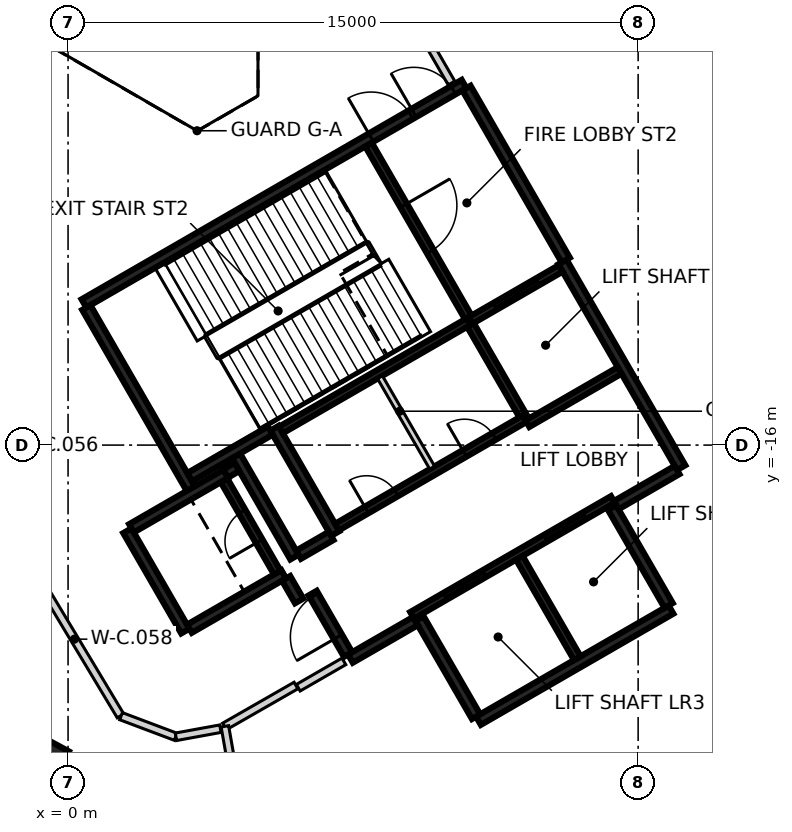
"""IFC4 building model, lengths in metres.
Left out: names, types, materials, properties, quantities, classifications, styles, units other than length and angle.
Written with IfcOpenShell. Run it as: python <this file> out.ifc"""

import sys

from ifc_helpers import new_model, si_unit, direction, frame, frame_2d, origin, origin_2d, place, context, subcontext, project, spatial, rectangle, extrude, element, fill, save


model = new_model("IFC4")
c1 = context("Model", 3, precision=1e-05, world=origin(), true_north=direction((0.0, 1.0)))
c2 = subcontext(c1, "Body", "Model", "MODEL_VIEW")
j1 = project(units=[si_unit("LENGTHUNIT", "METRE"), si_unit("PLANEANGLEUNIT", "RADIAN")], contexts=[c1])
p1 = place(None, origin())
s1 = spatial("IfcSite", under=j1, at=p1, CompositionType="ELEMENT")
p2 = place(p1, origin())
s2 = spatial("IfcBuilding", under=s1, at=p2, CompositionType="ELEMENT")
p3 = place(p2, frame((0.0, 0.0, 14.0)))
s3 = spatial("IfcBuildingStorey", under=s2, at=p3, CompositionType="ELEMENT", Elevation=14.0)
p4 = place(p3, frame((-1.197, -24.423, -0.35), z_axis=(0.0, 0.0, 1.0), x_axis=(0.476198301069, 0.879337920289, 0.0)))
e1 = element("IfcColumn", 1, at=p4, inside=s3, PredefinedType="COLUMN", context=c2, shape_type="SweptSolid", body=[
    extrude(rectangle(XDim=1.8, YDim=1.8, at=origin_2d()), origin(), (0.0, 0.0, 1.0), 3.1),
])
p5 = place(p3, frame((0.417, -12.273, 0.0), z_axis=(0.0, 0.0, 1.0), x_axis=(0.866021906294, 0.500006057782, 0.0)))
e2 = element("IfcWall", 2, at=p5, inside=s3, PredefinedType="SHEAR", context=c2, shape_type="SweptSolid", body=[
    extrude(rectangle(XDim=11.55, YDim=0.25, at=frame_2d((5.775, 0.0))), origin(), (0.0, 0.0, 1.0), 5.15),
])
p6 = place(p5, frame((10.025, 0.0, 0.0)))
e3 = element("IfcOpeningElement", 3, at=p6, cuts=e2, PredefinedType="OPENING", context=c2, shape_type="SweptSolid", body=[
    extrude(rectangle(XDim=1.2, YDim=2.1, at=frame_2d((0.6, 1.05))), frame((0.0, 0.135, 0.0), z_axis=(0.0, -1.0, 0.0), x_axis=(1.0, 0.0, 0.0)), (0.0, 0.0, 1.0), 0.27),
])
p7 = place(p5, frame((8.725, 0.0, 0.0)))
e4 = element("IfcOpeningElement", 4, at=p7, cuts=e2, PredefinedType="OPENING", context=c2, shape_type="SweptSolid", body=[
    extrude(rectangle(XDim=1.2, YDim=2.1, at=frame_2d((0.6, 1.05))), frame((0.0, 0.135, 0.0), z_axis=(0.0, -1.0, 0.0), x_axis=(1.0, 0.0, 0.0)), (0.0, 0.0, 1.0), 0.27),
])
p8 = place(p3, frame((13.008, -11.181, 0.0), z_axis=(0.0, 0.0, 1.0), x_axis=(0.500004234368, -0.866022959057, 0.0)))
e5 = element("IfcWall", 5, at=p8, inside=s3, PredefinedType="SHEAR", context=c2, shape_type="SweptSolid", body=[
    extrude(rectangle(XDim=6.25, YDim=0.25, at=frame_2d((3.125, 0.0))), origin(), (0.0, 0.0, 1.0), 5.15),
])
p9 = place(p3, frame((15.865, -20.328, 0.0), z_axis=(0.0, 0.0, 1.0), x_axis=(-0.86602852612, -0.499994591916, 0.0)))
e6 = element("IfcWall", 6, at=p9, inside=s3, PredefinedType="SHEAR", context=c2, shape_type="SweptSolid", body=[
    extrude(rectangle(XDim=5.85, YDim=0.25, at=frame_2d((2.925, 0.0))), origin(), (0.0, 0.0, 1.0), 5.15),
])
p10 = place(p3, frame((3.235, -17.153, 0.0), z_axis=(0.0, 0.0, 1.0), x_axis=(-0.500008851346, 0.866020293397, 0.0)))
e7 = element("IfcWall", 7, at=p10, inside=s3, PredefinedType="SHEAR", context=c2, shape_type="SweptSolid", body=[
    extrude(rectangle(XDim=5.51, YDim=0.25, at=frame_2d((2.755, 0.0))), origin(), (0.0, 0.0, 1.0), 5.15),
])
p11 = place(p3, frame((10.483, -6.606, 0.0), z_axis=(0.0, 0.0, 1.0), x_axis=(0.49999885962, -0.866026062182, 0.0)))
e8 = element("IfcWall", 8, at=p11, inside=s3, PredefinedType="SHEAR", context=c2, shape_type="SweptSolid", body=[
    extrude(rectangle(XDim=5.225, YDim=0.25, at=frame_2d((2.612, 0.0))), origin(), (0.0, 0.0, 1.0), 5.15),
])
p12 = place(p3, frame((7.031, -18.327, 0.0), z_axis=(0.0, 0.0, 1.0), x_axis=(-0.499971222258, 0.866042017984, 0.0)))
e9 = element("IfcWall", 9, at=p12, inside=s3, PredefinedType="SHEAR", context=c2, shape_type="SweptSolid", body=[
    extrude(rectangle(XDim=3.2, YDim=0.25, at=frame_2d((1.6, 0.0))), origin(), (0.0, 0.0, 1.0), 5.15),
])
for number, where, z_axis, x_axis in (
    (10, (14.315, -17.644, 0.0), (0.0, 0.0, 1.0), (0.5, -0.866, 0.0)),
    (11, (10.736, -23.145, 0.0), (0.0, 0.0, 1.0), (-0.5, 0.866, 0.0)),
):
    element("IfcWall", number, at=place(p3, frame(where, z_axis=z_axis, x_axis=x_axis)), inside=s3, PredefinedType="SHEAR", context=c2, shape_type="SweptSolid", body=[
        extrude(rectangle(XDim=2.974, YDim=0.25, at=frame_2d((1.487, 0.0))), origin(), (0.0, 0.0, 1.0), 5.15),
    ])
p13 = place(p3, frame((3.085, -20.894, 0.0), z_axis=(0.0, 0.0, 1.0), x_axis=(-0.499978833458, 0.866037623948, 0.0)))
e12 = element("IfcWall", 12, at=p13, inside=s3, PredefinedType="SHEAR", context=c2, shape_type="SweptSolid", body=[
    extrude(rectangle(XDim=3.05, YDim=0.25, at=frame_2d((1.525, 0.0))), origin(), (0.0, 0.0, 1.0), 5.15),
])
p14 = place(p3, frame((1.669, -18.19, 0.0), z_axis=(0.0, 0.0, 1.0), x_axis=(0.866042235819, 0.499970844928, 0.0)))
e13 = element("IfcWall", 13, at=p14, inside=s3, PredefinedType="SHEAR", context=c2, shape_type="SweptSolid", body=[
    extrude(rectangle(XDim=2.865, YDim=0.25, at=frame_2d((1.432, 0.0))), origin(), (0.0, 0.0, 1.0), 5.15),
])
p15 = place(p3, frame((5.675, -19.399, 0.0), z_axis=(0.0, 0.0, 1.0), x_axis=(-0.866026637627, -0.499997862916, 0.0)))
e14 = element("IfcWall", 14, at=p15, inside=s3, PredefinedType="SHEAR", context=c2, shape_type="SweptSolid", body=[
    extrude(rectangle(XDim=2.865, YDim=0.25, at=frame_2d((1.432, 0.0))), origin(), (0.0, 0.0, 1.0), 5.15),
])
p16 = place(p3, frame((4.414, -16.276, 0.0), z_axis=(0.0, 0.0, 1.0), x_axis=(0.500003324108, -0.866023484601, 0.0)))
e15 = element("IfcWall", 15, at=p16, inside=s3, PredefinedType="SHEAR", context=c2, shape_type="SweptSolid", body=[
    extrude(rectangle(XDim=3.085, YDim=0.25, at=frame_2d((1.542, 0.0))), origin(), (0.0, 0.0, 1.0), 5.15),
])
p17 = place(p3, frame((5.322, -15.619, 0.0), z_axis=(0.0, 0.0, 1.0), x_axis=(-0.866026229868, -0.499998569178, 0.0)))
e16 = element("IfcWall", 16, at=p17, inside=s3, PredefinedType="SHEAR", context=c2, shape_type="SweptSolid", body=[
    extrude(rectangle(XDim=2.449, YDim=0.25, at=frame_2d((1.225, 0.0))), origin(), (0.0, 0.0, 1.0), 5.15),
])
p18 = place(p3, frame((9.14, -20.631, 0.0), z_axis=(0.0, 0.0, 1.0), x_axis=(-0.866043531843, -0.499968599967, 0.0)))
e17 = element("IfcWall", 17, at=p18, inside=s3, PredefinedType="SHEAR", context=c2, shape_type="SweptSolid", body=[
    extrude(rectangle(XDim=1.975, YDim=0.25, at=frame_2d((0.987, 0.0))), origin(), (0.0, 0.0, 1.0), 5.15),
])
p19 = place(p3, frame((16.025, -16.656, 0.0), z_axis=(0.0, 0.0, 1.0), x_axis=(-0.866016279763, -0.500015802937, 0.0)))
e18 = element("IfcWall", 18, at=p19, inside=s3, PredefinedType="SHEAR", context=c2, shape_type="SweptSolid", body=[
    extrude(rectangle(XDim=1.849, YDim=0.25, at=frame_2d((0.925, 0.0))), origin(), (0.0, 0.0, 1.0), 5.15),
])
p20 = place(p3, frame((7.367, -21.51, 0.0), z_axis=(0.0, 0.0, 1.0), x_axis=(-0.499983108224, 0.866035156036, 0.0)))
e19 = element("IfcWall", 19, at=p20, inside=s3, PredefinedType="SHEAR", context=c2, shape_type="SweptSolid", body=[
    extrude(rectangle(XDim=1.865, YDim=0.25, at=frame_2d((0.932, 0.0))), origin(), (0.0, 0.0, 1.0), 5.15),
])
p21 = place(p20, frame((0.535, 0.0, 0.0)))
e20 = element("IfcOpeningElement", 20, at=p21, cuts=e19, PredefinedType="OPENING", context=c2, shape_type="SweptSolid", body=[
    extrude(rectangle(XDim=1.25, YDim=2.1, at=frame_2d((0.625, 1.05))), frame((0.0, 0.135, 0.0), z_axis=(0.0, -1.0, 0.0), x_axis=(1.0, 0.0, 0.0)), (0.0, 0.0, 1.0), 0.27),
])
p22 = place(p3, frame((6.065, -18.885, 0.0), z_axis=(0.0, 0.0, 1.0), x_axis=(0.866017078145, 0.500014420154, 0.0)))
e21 = element("IfcWall", 21, at=p22, inside=s3, PredefinedType="SHEAR", context=c2, shape_type="SweptSolid", body=[
    extrude(rectangle(XDim=0.989, YDim=0.25, at=frame_2d((0.495, 0.0))), origin(), (0.0, 0.0, 1.0), 5.15),
])
p23 = place(p3, frame((6.08, -20.1, 0.0), z_axis=(0.0, 0.0, 1.0), x_axis=(-0.500051773299, 0.865995510393, 0.0)))
e22 = element("IfcWall", 22, at=p23, inside=s3, PredefinedType="SHEAR", context=c2, shape_type="SweptSolid", body=[
    extrude(rectangle(XDim=0.685, YDim=0.25, at=frame_2d((0.342, 0.0))), origin(), (0.0, 0.0, 1.0), 5.15),
])
p24 = place(p3, frame((4.145, -16.749, 0.0), z_axis=(0.0, 0.0, 1.0), x_axis=(0.866185586049, 0.49972245349, 0.0)))
e23 = element("IfcWall", 23, at=p24, inside=s3, PredefinedType="SHEAR", context=c2, shape_type="SweptSolid", body=[
    extrude(rectangle(XDim=0.344, YDim=0.25, at=frame_2d((0.172, 0.0))), origin(), (0.0, 0.0, 1.0), 5.15),
])
p25 = place(p3, frame((9.052, -20.48, 0.0), z_axis=(0.0, 0.0, 1.0), x_axis=(0.866030299012, 0.499991521122, 0.0)))
e24 = element("IfcWall", 24, at=p25, inside=s3, PredefinedType="SHEAR", context=c2, shape_type="SweptSolid", body=[
    extrude(rectangle(XDim=6.1, YDim=0.2, at=frame_2d((3.05, 0.0))), origin(), (0.0, 0.0, 1.0), 5.15),
])
p26 = place(p25, frame((1.0, 0.0, 0.0)))
e25 = element("IfcOpeningElement", 25, at=p26, cuts=e24, PredefinedType="OPENING", context=c2, shape_type="SweptSolid", body=[
    extrude(rectangle(XDim=1.2, YDim=2.1, at=frame_2d((0.6, 1.05))), frame((0.0, 0.11, 0.0), z_axis=(0.0, -1.0, 0.0), x_axis=(1.0, 0.0, 0.0)), (0.0, 0.0, 1.0), 0.22),
])
p27 = place(p25, frame((4.05, 0.0, 0.0)))
e26 = element("IfcOpeningElement", 26, at=p27, cuts=e24, PredefinedType="OPENING", context=c2, shape_type="SweptSolid", body=[
    extrude(rectangle(XDim=1.2, YDim=2.1, at=frame_2d((0.6, 1.05))), frame((0.0, 0.11, 0.0), z_axis=(0.0, -1.0, 0.0), x_axis=(1.0, 0.0, 0.0)), (0.0, 0.0, 1.0), 0.22),
])
p28 = place(p3, frame((10.538, -12.752, 0.0), z_axis=(0.0, 0.0, 1.0), x_axis=(-0.866038630372, -0.499977090179, 0.0)))
e27 = element("IfcWall", 27, at=p28, inside=s3, PredefinedType="SHEAR", context=c2, shape_type="SweptSolid", body=[
    extrude(rectangle(XDim=5.699, YDim=0.2, at=frame_2d((2.85, 0.0))), origin(), (0.0, 0.0, 1.0), 5.15),
])
p29 = place(p3, frame((7.077, -18.156, 0.0), z_axis=(0.0, 0.0, 1.0), x_axis=(0.866038630372, 0.499977090179, 0.0)))
e28 = element("IfcWall", 28, at=p29, inside=s3, PredefinedType="SHEAR", context=c2, shape_type="SweptSolid", body=[
    extrude(rectangle(XDim=5.699, YDim=0.2, at=frame_2d((2.85, 0.0))), origin(), (0.0, 0.0, 1.0), 5.15),
])
p30 = place(p29, frame((0.899, 0.0, 0.0)))
e29 = element("IfcOpeningElement", 29, at=p30, cuts=e28, PredefinedType="OPENING", context=c2, shape_type="SweptSolid", body=[
    extrude(rectangle(XDim=0.9, YDim=2.1, at=frame_2d((0.45, 1.05))), frame((0.0, 0.11, 0.0), z_axis=(0.0, -1.0, 0.0), x_axis=(1.0, 0.0, 0.0)), (0.0, 0.0, 1.0), 0.22),
])
p31 = place(p29, frame((3.874, 0.0, 0.0)))
e30 = element("IfcOpeningElement", 30, at=p31, cuts=e28, PredefinedType="OPENING", context=c2, shape_type="SweptSolid", body=[
    extrude(rectangle(XDim=0.9, YDim=2.1, at=frame_2d((0.45, 1.05))), frame((0.0, 0.11, 0.0), z_axis=(0.0, -1.0, 0.0), x_axis=(1.0, 0.0, 0.0)), (0.0, 0.0, 1.0), 0.22),
])
p32 = place(p3, frame((7.906, -8.094, 0.0), z_axis=(0.0, 0.0, 1.0), x_axis=(0.500024287448, -0.866011380966, 0.0)))
e31 = element("IfcWall", 31, at=p32, inside=s3, PredefinedType="SHEAR", context=c2, shape_type="SweptSolid", body=[
    extrude(rectangle(XDim=5.251, YDim=0.2, at=frame_2d((2.625, 0.0))), origin(), (0.0, 0.0, 1.0), 5.15),
])
p33 = place(p32, frame((1.849, 0.0, 0.0)))
e32 = element("IfcOpeningElement", 32, at=p33, cuts=e31, PredefinedType="OPENING", context=c2, shape_type="SweptSolid", body=[
    extrude(rectangle(XDim=1.4, YDim=2.1, at=frame_2d((0.7, 1.05))), frame((0.0, 0.11, 0.0), z_axis=(0.0, -1.0, 0.0), x_axis=(1.0, 0.0, 0.0)), (0.0, 0.0, 1.0), 0.22),
])
p34 = place(p3, frame((11.875, -18.967, 0.0), z_axis=(0.0, 0.0, 1.0), x_axis=(0.49998131003, -0.866036194175, 0.0)))
e33 = element("IfcWall", 33, at=p34, inside=s3, PredefinedType="SHEAR", context=c2, shape_type="SweptSolid", body=[
    extrude(rectangle(XDim=3.048, YDim=0.2, at=frame_2d((1.524, 0.0))), origin(), (0.0, 0.0, 1.0), 5.15),
])
p35 = place(p3, frame((5.503, -19.352, 0.0), z_axis=(0.0, 0.0, 1.0), x_axis=(-0.499986818241, 0.866033014143, 0.0)))
e34 = element("IfcWall", 34, at=p35, inside=s3, PredefinedType="SHEAR", context=c2, shape_type="SweptSolid", body=[
    extrude(rectangle(XDim=2.798, YDim=0.2, at=frame_2d((1.399, 0.0))), origin(), (0.0, 0.0, 1.0), 5.15),
])
p36 = place(p35, frame((0.949, 0.0, 0.0)))
e35 = element("IfcOpeningElement", 35, at=p36, cuts=e34, PredefinedType="OPENING", context=c2, shape_type="SweptSolid", body=[
    extrude(rectangle(XDim=0.9, YDim=2.1, at=frame_2d((0.45, 1.05))), frame((0.0, 0.11, 0.0), z_axis=(0.0, -1.0, 0.0), x_axis=(1.0, 0.0, 0.0)), (0.0, 0.0, 1.0), 0.22),
])
p37 = place(p3, frame((11.963, -15.22, 0.0), z_axis=(0.0, 0.0, 1.0), x_axis=(-0.500034990121, 0.866005201286, 0.0)))
e36 = element("IfcWall", 36, at=p37, inside=s3, PredefinedType="SHEAR", context=c2, shape_type="SweptSolid", body=[
    extrude(rectangle(XDim=2.75, YDim=0.2, at=frame_2d((1.375, 0.0))), origin(), (0.0, 0.0, 1.0), 5.15),
])
p38 = place(p3, frame((10.587, -12.723, 0.0), z_axis=(0.0, 0.0, 1.0), x_axis=(0.866037306777, 0.499979382845, 0.0)))
e37 = element("IfcWall", 37, at=p38, inside=s3, PredefinedType="SHEAR", context=c2, shape_type="SweptSolid", body=[
    extrude(rectangle(XDim=2.742, YDim=0.2, at=frame_2d((1.371, 0.0))), origin(), (0.0, 0.0, 1.0), 5.15),
])
p39 = place(p38, frame((0.743, 0.0, 0.0)))
e38 = element("IfcOpeningElement", 38, at=p39, cuts=e37, PredefinedType="OPENING", context=c2, shape_type="SweptSolid", body=[
    extrude(rectangle(XDim=1.3, YDim=2.1, at=frame_2d((0.65, 1.05))), frame((0.0, 0.11, 0.0), z_axis=(0.0, -1.0, 0.0), x_axis=(1.0, 0.0, 0.0)), (0.0, 0.0, 1.0), 0.22),
])
p40 = place(p3, frame((14.512, -14.037, 0.0), z_axis=(0.0, 0.0, 1.0), x_axis=(-0.866044696403, -0.499966582715, 0.0)))
e39 = element("IfcWall", 39, at=p40, inside=s3, PredefinedType="SHEAR", context=c2, shape_type="SweptSolid", body=[
    extrude(rectangle(XDim=2.799, YDim=0.2, at=frame_2d((1.399, 0.0))), origin(), (0.0, 0.0, 1.0), 5.15),
])
p41 = place(p3, frame((8.207, -14.214, 0.0), z_axis=(0.0, 0.0, 1.0), x_axis=(0.50002746344, -0.86600954718, 0.0)))
e40 = element("IfcWall", 40, at=p41, inside=s3, PredefinedType="PARTITIONING", context=c2, shape_type="SweptSolid", body=[
    extrude(rectangle(XDim=2.748, YDim=0.15, at=frame_2d((1.374, 0.0))), origin(), (0.0, 0.0, 1.0), 5.15),
])
p42 = place(p3, frame((-1.045, -19.088, 0.0), z_axis=(0.0, 0.0, 1.0), x_axis=(0.51489213726, -0.857254971982, 0.0)))
e41 = element("IfcWall", 41, at=p42, inside=s3, PredefinedType="PARTITIONING", context=c2, shape_type="SweptSolid", body=[
    extrude(rectangle(XDim=4.709, YDim=0.2, at=frame_2d((2.354, 0.0))), origin(), (0.0, 0.0, 1.0), 5.15),
])
p43 = place(p3, frame((1.394, -23.133, 0.0), z_axis=(0.0, 0.0, 1.0), x_axis=(0.935740267615, -0.352689880154, 0.0)))
e42 = element("IfcWall", 42, at=p43, inside=s3, PredefinedType="PARTITIONING", context=c2, shape_type="SweptSolid", body=[
    extrude(rectangle(XDim=1.537, YDim=0.2, at=frame_2d((0.768, 0.0))), origin(), (0.0, 0.0, 1.0), 5.15),
])
p44 = place(p3, frame((2.839, -23.675, 0.0), z_axis=(0.0, 0.0, 1.0), x_axis=(0.983781026783, 0.179373608267, 0.0)))
e43 = element("IfcWall", 43, at=p44, inside=s3, PredefinedType="PARTITIONING", context=c2, shape_type="SweptSolid", body=[
    extrude(rectangle(XDim=1.188, YDim=0.2, at=frame_2d((0.594, 0.0))), origin(), (0.0, 0.0, 1.0), 5.15),
])
p45 = place(p3, frame((4.116, -23.404, 0.0), z_axis=(0.0, 0.0, 1.0), x_axis=(0.867604920029, 0.497254163121, 0.0)))
e44 = element("IfcWall", 44, at=p45, inside=s3, PredefinedType="PARTITIONING", context=c2, shape_type="SweptSolid", body=[
    extrude(rectangle(XDim=2.168, YDim=0.2, at=frame_2d((1.084, 0.0))), origin(), (0.0, 0.0, 1.0), 5.15),
])
p46 = place(p3, frame((6.057, -22.384, 0.0), z_axis=(0.0, 0.0, 1.0), x_axis=(0.866100566266, 0.499869792159, 0.0)))
e45 = element("IfcWall", 45, at=p46, inside=s3, PredefinedType="PARTITIONING", context=c2, shape_type="SweptSolid", body=[
    extrude(rectangle(XDim=1.386, YDim=0.2, at=frame_2d((0.693, 0.0))), origin(), (0.0, 0.0, 1.0), 5.15),
])
p47 = place(p3, frame((9.101, -4.763, 0.0), z_axis=(0.0, 0.0, 1.0), x_axis=(0.500150029396, -0.865938766944, 0.0)))
e46 = element("IfcWall", 46, at=p47, inside=s3, PredefinedType="PARTITIONING", context=c2, shape_type="SweptSolid", body=[
    extrude(rectangle(XDim=1.977, YDim=0.2, at=frame_2d((0.989, 0.0))), origin(), (0.0, 0.0, 1.0), 5.15),
])
p48 = place(p3, frame((4.126, -23.4, 0.0), z_axis=(0.0, 0.0, 1.0), x_axis=(0.173678575234, -0.984802392617, 0.0)))
e47 = element("IfcWall", 47, at=p48, inside=s3, PredefinedType="PARTITIONING", context=c2, shape_type="SweptSolid", body=[
    extrude(rectangle(XDim=11.48, YDim=0.2, at=frame_2d((5.74, 0.0))), origin(), (0.0, 0.0, 1.0), 2.75),
])
p49 = place(p39, origin())
e48 = element("IfcDoor", 48, at=p49, inside=s3, OperationType="SLIDING_TO_RIGHT", PredefinedType="DOOR", context=c2, shape_type="SweptSolid", body=[
    extrude(rectangle(XDim=1.3, YDim=2.1, at=frame_2d((0.65, 1.05))), frame((0.0, 0.025, 0.0), z_axis=(0.0, -1.0, 0.0), x_axis=(1.0, 0.0, 0.0)), (0.0, 0.0, 1.0), 0.05),
])
fill(e38, e48)
p50 = place(p26, origin())
e49 = element("IfcDoor", 49, at=p50, inside=s3, OperationType="DOUBLE_DOOR_SLIDING", PredefinedType="DOOR", context=c2, shape_type="SweptSolid", body=[
    extrude(rectangle(XDim=1.2, YDim=2.1, at=frame_2d((0.6, 1.05))), frame((0.0, 0.025, 0.0), z_axis=(0.0, -1.0, 0.0), x_axis=(1.0, 0.0, 0.0)), (0.0, 0.0, 1.0), 0.05),
])
fill(e25, e49)
p51 = place(p27, origin())
e50 = element("IfcDoor", 50, at=p51, inside=s3, OperationType="DOUBLE_DOOR_SLIDING", PredefinedType="DOOR", context=c2, shape_type="SweptSolid", body=[
    extrude(rectangle(XDim=1.2, YDim=2.1, at=frame_2d((0.6, 1.05))), frame((0.0, 0.025, 0.0), z_axis=(0.0, -1.0, 0.0), x_axis=(1.0, 0.0, 0.0)), (0.0, 0.0, 1.0), 0.05),
])
fill(e26, e50)
p52 = place(p21, origin())
e51 = element("IfcDoor", 51, at=p52, inside=s3, OperationType="SINGLE_SWING_LEFT", PredefinedType="DOOR", context=c2, shape_type="SweptSolid", body=[
    extrude(rectangle(XDim=1.25, YDim=2.1, at=frame_2d((0.625, 1.05))), frame((0.0, 0.025, 0.0), z_axis=(0.0, -1.0, 0.0), x_axis=(1.0, 0.0, 0.0)), (0.0, 0.0, 1.0), 0.05),
])
fill(e20, e51)
p53 = place(p6, origin())
e52 = element("IfcDoor", 52, at=p53, inside=s3, OperationType="SINGLE_SWING_LEFT", PredefinedType="DOOR", context=c2, shape_type="SweptSolid", body=[
    extrude(rectangle(XDim=1.2, YDim=2.1, at=frame_2d((0.6, 1.05))), frame((0.0, 0.025, 0.0), z_axis=(0.0, -1.0, 0.0), x_axis=(1.0, 0.0, 0.0)), (0.0, 0.0, 1.0), 0.05),
])
fill(e3, e52)
p54 = place(p7, origin())
e53 = element("IfcDoor", 53, at=p54, inside=s3, OperationType="SINGLE_SWING_RIGHT", PredefinedType="DOOR", context=c2, shape_type="SweptSolid", body=[
    extrude(rectangle(XDim=1.2, YDim=2.1, at=frame_2d((0.6, 1.05))), frame((0.0, 0.025, 0.0), z_axis=(0.0, -1.0, 0.0), x_axis=(1.0, 0.0, 0.0)), (0.0, 0.0, 1.0), 0.05),
])
fill(e4, e53)
p55 = place(p33, origin())
e54 = element("IfcDoor", 54, at=p55, inside=s3, OperationType="SINGLE_SWING_RIGHT", PredefinedType="DOOR", context=c2, shape_type="SweptSolid", body=[
    extrude(rectangle(XDim=1.4, YDim=2.1, at=frame_2d((0.7, 1.05))), frame((0.0, 0.025, 0.0), z_axis=(0.0, -1.0, 0.0), x_axis=(1.0, 0.0, 0.0)), (0.0, 0.0, 1.0), 0.05),
])
fill(e32, e54)
p56 = place(p30, origin())
e55 = element("IfcDoor", 55, at=p56, inside=s3, OperationType="SINGLE_SWING_LEFT", PredefinedType="DOOR", context=c2, shape_type="SweptSolid", body=[
    extrude(rectangle(XDim=0.9, YDim=2.1, at=frame_2d((0.45, 1.05))), frame((0.0, 0.025, 0.0), z_axis=(0.0, -1.0, 0.0), x_axis=(1.0, 0.0, 0.0)), (0.0, 0.0, 1.0), 0.05),
])
fill(e29, e55)
p57 = place(p31, origin())
e56 = element("IfcDoor", 56, at=p57, inside=s3, OperationType="SINGLE_SWING_RIGHT", PredefinedType="DOOR", context=c2, shape_type="SweptSolid", body=[
    extrude(rectangle(XDim=0.9, YDim=2.1, at=frame_2d((0.45, 1.05))), frame((0.0, 0.025, 0.0), z_axis=(0.0, -1.0, 0.0), x_axis=(1.0, 0.0, 0.0)), (0.0, 0.0, 1.0), 0.05),
])
fill(e30, e56)
p58 = place(p36, origin())
e57 = element("IfcDoor", 57, at=p58, inside=s3, OperationType="SINGLE_SWING_LEFT", PredefinedType="DOOR", context=c2, shape_type="SweptSolid", body=[
    extrude(rectangle(XDim=0.9, YDim=2.1, at=frame_2d((0.45, 1.05))), frame((0.0, 0.025, 0.0), z_axis=(0.0, -1.0, 0.0), x_axis=(1.0, 0.0, 0.0)), (0.0, 0.0, 1.0), 0.05),
])
fill(e35, e57)
save(model, sys.argv[1])
